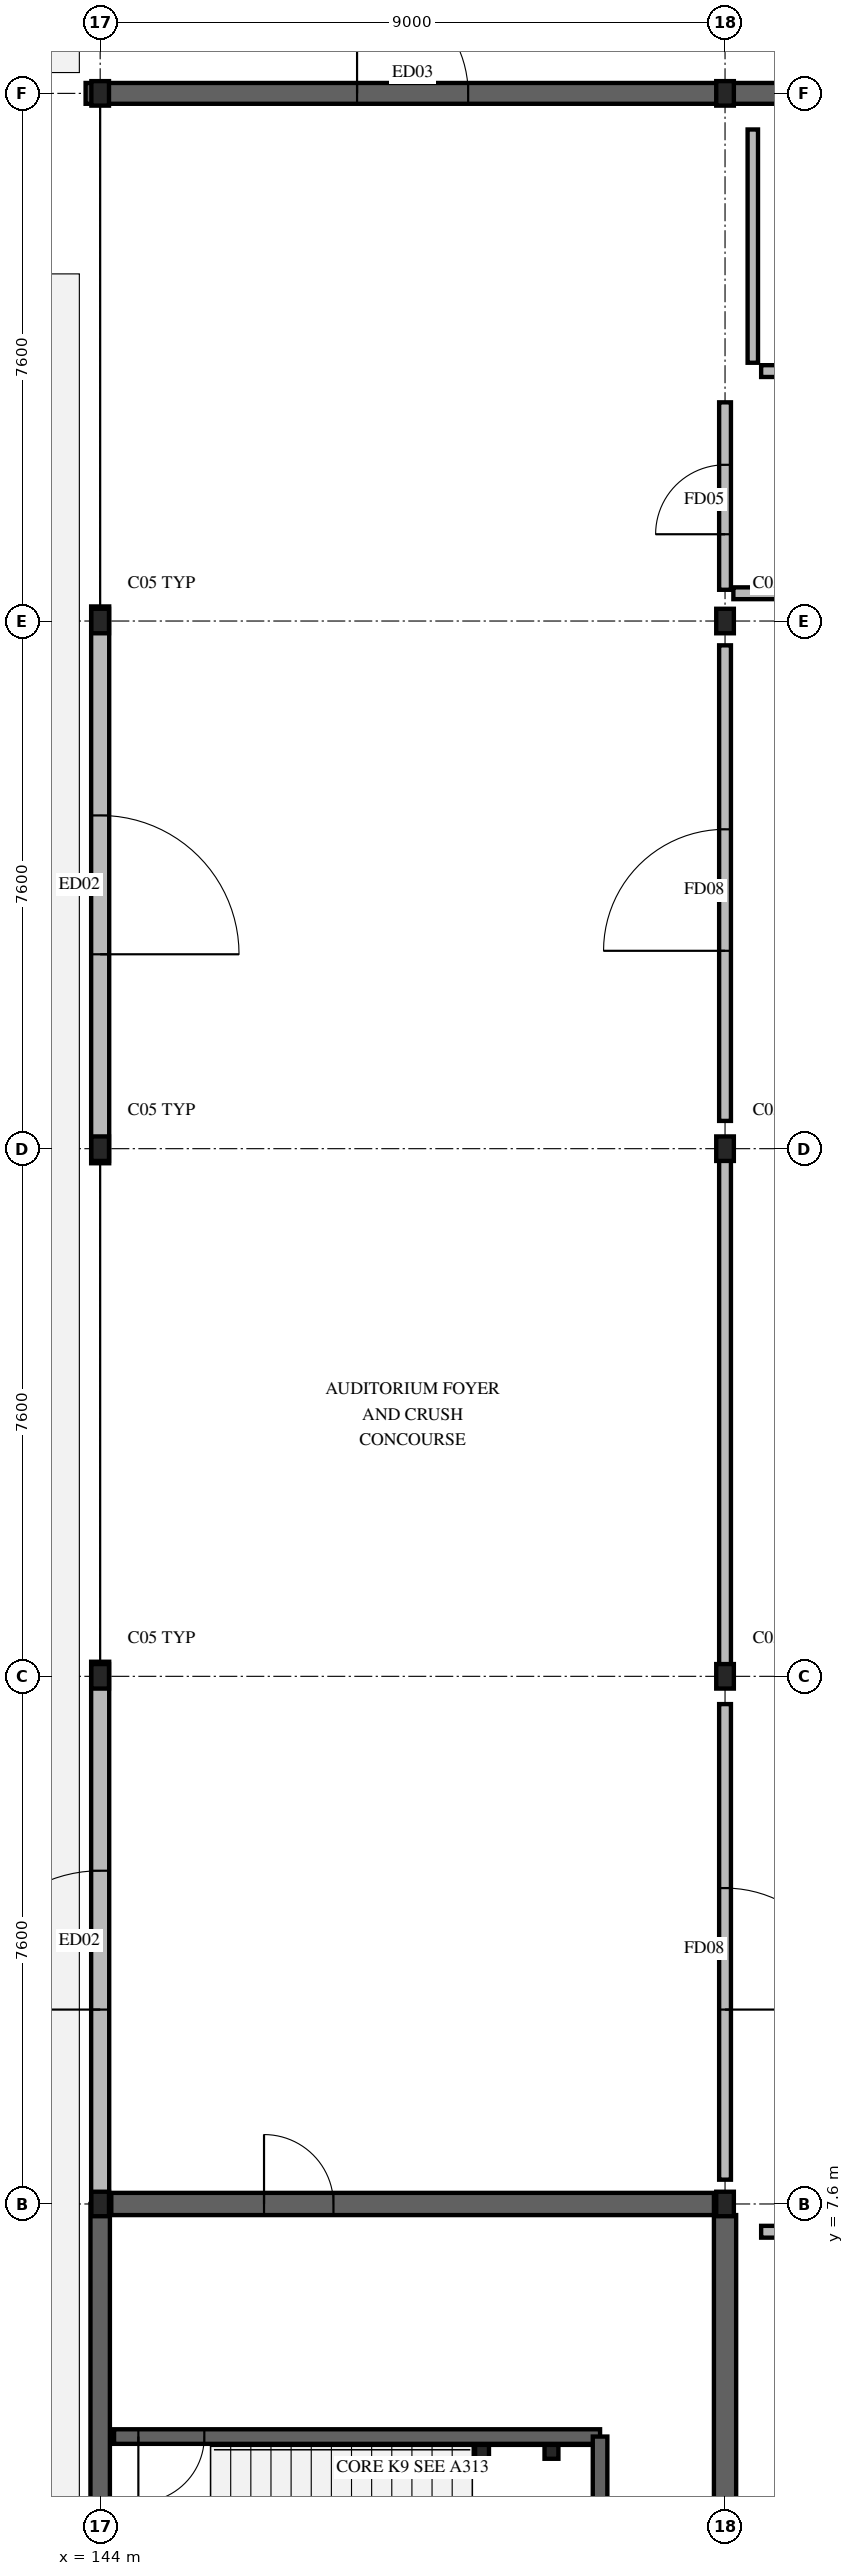
"""IFC4 building model, lengths in metres.
Left out: names, types, materials, properties, quantities, classifications, styles, units other than length and angle.
Written with IfcOpenShell. Run it as: python <this file> out.ifc"""

import sys

from ifc_helpers import new_model, si_unit, direction, frame, frame_2d, origin, origin_2d, place, context, subcontext, project, spatial, rectangle, hollow_rectangle, i_section, extrude, element, fill, save


model = new_model("IFC4")
c1 = context("Model", 3, precision=1e-05, world=origin(), true_north=direction((0.0, 1.0)))
c2 = subcontext(c1, "Body", "Model", "MODEL_VIEW")
j1 = project(units=[si_unit("LENGTHUNIT", "METRE"), si_unit("PLANEANGLEUNIT", "RADIAN")], contexts=[c1])
p1 = place(None, origin())
s1 = spatial("IfcSite", under=j1, at=p1, CompositionType="ELEMENT")
p2 = place(p1, origin())
s2 = spatial("IfcBuilding", under=s1, at=p2, CompositionType="ELEMENT")
p3 = place(p2, origin())
s3 = spatial("IfcBuildingStorey", under=s2, at=p3, CompositionType="ELEMENT", Elevation=0.0)
for number, where, z_axis, x_axis in (
    (1, (144.0, 7.6, 0.0), (0.0, 0.0, 1.0), (1.0, 0.0, 0.0)),
    (2, (144.0, 15.2, 0.0), (0.0, 0.0, 1.0), (1.0, 0.0, 0.0)),
    (3, (144.0, 22.8, 0.0), (0.0, 0.0, 1.0), (1.0, 0.0, 0.0)),
    (4, (144.0, 30.4, 0.0), (0.0, 0.0, 1.0), (1.0, 0.0, 0.0)),
    (5, (144.0, 38.0, 0.0), (0.0, 0.0, 1.0), (1.0, 0.0, 0.0)),
    (6, (153.0, 7.6, 0.0), (0.0, 0.0, 1.0), (1.0, 0.0, 0.0)),
    (7, (153.0, 15.2, 0.0), (0.0, 0.0, 1.0), (1.0, 0.0, 0.0)),
    (8, (153.0, 22.8, 0.0), (0.0, 0.0, 1.0), (1.0, 0.0, 0.0)),
    (9, (153.0, 30.4, 0.0), (0.0, 0.0, 1.0), (1.0, 0.0, 0.0)),
    (10, (153.0, 38.0, 0.0), (0.0, 0.0, 1.0), (1.0, 0.0, 0.0)),
):
    element("IfcColumn", number, at=place(p3, frame(where, z_axis=z_axis, x_axis=x_axis)), inside=s3, PredefinedType="COLUMN", context=c2, shape_type="SweptSolid", body=[
        extrude(i_section(OverallWidth=0.254, OverallDepth=0.353, WebThickness=0.01, FlangeThickness=0.016, FilletRadius=0.015, at=origin_2d()), origin(), (0.0, 0.0, 1.0), 5.04),
    ])
p4 = place(p3, frame((144.0, 0.0, 0.0), z_axis=(0.0, 0.0, 1.0), x_axis=(0.0, 1.0, 0.0)))
e11 = element("IfcWall", 11, at=p4, inside=s3, PredefinedType="SOLIDWALL", context=c2, shape_type="SweptSolid", body=[
    extrude(rectangle(XDim=7.6, YDim=0.28, at=frame_2d((3.8, 0.0))), origin(), (0.0, 0.0, 1.0), 5.04),
])
p5 = place(p3, frame((144.0, 7.6, 0.0), z_axis=(0.0, 0.0, 1.0), x_axis=(0.0, 1.0, 0.0)))
e12 = element("IfcWall", 12, at=p5, inside=s3, PredefinedType="STANDARD", context=c2, shape_type="SweptSolid", body=[
    extrude(rectangle(XDim=7.81, YDim=0.26, at=frame_2d((3.905, 0.0))), origin(), (0.0, 0.0, 1.0), 4.411),
])
p6 = place(p5, frame((2.8, 0.0, 0.0)))
e13 = element("IfcOpeningElement", 13, at=p6, cuts=e12, PredefinedType="OPENING", context=c2, shape_type="SweptSolid", body=[
    extrude(rectangle(XDim=2.0, YDim=2.35, at=frame_2d((1.0, 1.175))), frame((0.0, 0.14, 0.0), z_axis=(0.0, -1.0, 0.0), x_axis=(1.0, 0.0, 0.0)), (0.0, 0.0, 1.0), 0.28),
])
p7 = place(p3, frame((144.0, 22.59, 0.0), z_axis=(0.0, 0.0, 1.0), x_axis=(0.0, 1.0, 0.0)))
e14 = element("IfcWall", 14, at=p7, inside=s3, PredefinedType="STANDARD", context=c2, shape_type="SweptSolid", body=[
    extrude(rectangle(XDim=8.02, YDim=0.26, at=frame_2d((4.01, 0.0))), origin(), (0.0, 0.0, 1.0), 4.411),
])
p8 = place(p7, frame((3.01, 0.0, 0.0)))
e15 = element("IfcOpeningElement", 15, at=p8, cuts=e14, PredefinedType="OPENING", context=c2, shape_type="SweptSolid", body=[
    extrude(rectangle(XDim=2.0, YDim=2.35, at=frame_2d((1.0, 1.175))), frame((0.0, 0.14, 0.0), z_axis=(0.0, -1.0, 0.0), x_axis=(1.0, 0.0, 0.0)), (0.0, 0.0, 1.0), 0.28),
])
p9 = place(p3, frame((143.79, 38.0, 0.0), z_axis=(0.0, 0.0, 1.0), x_axis=(1.0, 0.0, 0.0)))
e16 = element("IfcWall", 16, at=p9, inside=s3, PredefinedType="SOLIDWALL", context=c2, shape_type="SweptSolid", body=[
    extrude(rectangle(XDim=9.21, YDim=0.3, at=frame_2d((4.605, 0.0))), origin(), (0.0, 0.0, 1.0), 5.04),
])
p10 = place(p9, frame((3.91, 0.0, 0.0)))
e17 = element("IfcOpeningElement", 17, at=p10, cuts=e16, PredefinedType="OPENING", context=c2, shape_type="SweptSolid", body=[
    extrude(rectangle(XDim=1.6, YDim=2.2, at=frame_2d((0.8, 1.1))), frame((0.0, 0.16, 0.0), z_axis=(0.0, -1.0, 0.0), x_axis=(1.0, 0.0, 0.0)), (0.0, 0.0, 1.0), 0.32),
])
p11 = place(p3, frame((153.0, 38.0, 0.0), z_axis=(0.0, 0.0, 1.0), x_axis=(1.0, 0.0, 0.0)))
e18 = element("IfcWall", 18, at=p11, inside=s3, PredefinedType="SOLIDWALL", context=c2, shape_type="SweptSolid", body=[
    extrude(rectangle(XDim=9.0, YDim=0.3, at=frame_2d((4.5, 0.0))), origin(), (0.0, 0.0, 1.0), 5.04),
])
p12 = place(p3, frame((144.16, 7.6, 0.0), z_axis=(0.0, 0.0, 1.0), x_axis=(1.0, 0.0, 0.0)))
e19 = element("IfcWall", 19, at=p12, inside=s3, PredefinedType="SHEAR", context=c2, shape_type="SweptSolid", body=[
    extrude(rectangle(XDim=8.68, YDim=0.32, at=frame_2d((4.34, 0.0))), origin(), (0.0, 0.0, 1.0), 4.76),
])
p13 = place(p12, frame((2.2, 0.0, 0.0)))
e20 = element("IfcOpeningElement", 20, at=p13, cuts=e19, PredefinedType="OPENING", context=c2, shape_type="SweptSolid", body=[
    extrude(rectangle(XDim=1.0, YDim=2.15, at=frame_2d((0.5, 1.075))), frame((0.0, 0.17, 0.0), z_axis=(0.0, -1.0, 0.0), x_axis=(1.0, 0.0, 0.0)), (0.0, 0.0, 1.0), 0.34),
])
p14 = place(p3, frame((153.0, 0.16, 0.0), z_axis=(0.0, 0.0, 1.0), x_axis=(0.0, 1.0, 0.0)))
e21 = element("IfcWall", 21, at=p14, inside=s3, PredefinedType="SHEAR", context=c2, shape_type="SweptSolid", body=[
    extrude(rectangle(XDim=7.28, YDim=0.32, at=frame_2d((3.64, 0.0))), origin(), (0.0, 0.0, 1.0), 4.76),
])
p15 = place(p3, frame((144.2, 4.25, 0.0), z_axis=(0.0, 0.0, 1.0), x_axis=(1.0, 0.0, 0.0)))
e22 = element("IfcWall", 22, at=p15, inside=s3, PredefinedType="SOLIDWALL", context=c2, shape_type="SweptSolid", body=[
    extrude(rectangle(XDim=7.0, YDim=0.21, at=frame_2d((3.5, 0.0))), origin(), (0.0, 0.0, 1.0), 4.76),
])
p16 = place(p15, frame((0.35, 0.0, 0.0)))
e23 = element("IfcOpeningElement", 23, at=p16, cuts=e22, PredefinedType="OPENING", context=c2, shape_type="SweptSolid", body=[
    extrude(rectangle(XDim=0.95, YDim=2.12, at=frame_2d((0.475, 1.06))), frame((0.0, 0.115, 0.0), z_axis=(0.0, -1.0, 0.0), x_axis=(1.0, 0.0, 0.0)), (0.0, 0.0, 1.0), 0.23),
])
p17 = place(p3, frame((151.2, 0.2, 0.0), z_axis=(0.0, 0.0, 1.0), x_axis=(0.0, 1.0, 0.0)))
e24 = element("IfcWall", 24, at=p17, inside=s3, PredefinedType="SOLIDWALL", context=c2, shape_type="SweptSolid", body=[
    extrude(rectangle(XDim=4.05, YDim=0.21, at=frame_2d((2.025, 0.0))), origin(), (0.0, 0.0, 1.0), 4.76),
])
for number, where, z_axis, x_axis in (
    (25, (149.5, 4.03, 0.0), (0.0, 0.0, 1.0), (1.0, 0.0, 0.0)),
    (26, (150.5, 4.03, 0.0), (0.0, 0.0, 1.0), (1.0, 0.0, 0.0)),
):
    element("IfcColumn", number, at=place(p3, frame(where, z_axis=z_axis, x_axis=x_axis)), inside=s3, PredefinedType="COLUMN", context=c2, shape_type="SweptSolid", body=[
        extrude(hollow_rectangle(XDim=0.2, YDim=0.2, WallThickness=0.012, at=origin_2d()), origin(), (0.0, 0.0, 1.0), 5.04),
    ])
p18 = place(p3, frame((153.0, 30.85, 0.0), z_axis=(0.0, 0.0, 1.0), x_axis=(0.0, 1.0, 0.0)))
e27 = element("IfcWall", 27, at=p18, inside=s3, PredefinedType="PARTITIONING", context=c2, shape_type="SweptSolid", body=[
    extrude(rectangle(XDim=2.7, YDim=0.17, at=frame_2d((1.35, 0.0))), origin(), (0.0, 0.0, 1.0), 4.411),
])
p19 = place(p18, frame((0.8, 0.0, 0.0)))
e28 = element("IfcOpeningElement", 28, at=p19, cuts=e27, PredefinedType="OPENING", context=c2, shape_type="SweptSolid", body=[
    extrude(rectangle(XDim=1.0, YDim=2.15, at=frame_2d((0.5, 1.075))), frame((0.0, 0.095, 0.0), z_axis=(0.0, -1.0, 0.0), x_axis=(1.0, 0.0, 0.0)), (0.0, 0.0, 1.0), 0.19),
])
p20 = place(p3, frame((153.0, 7.95, 0.0), z_axis=(0.0, 0.0, 1.0), x_axis=(0.0, 1.0, 0.0)))
e29 = element("IfcWall", 29, at=p20, inside=s3, PredefinedType="PARTITIONING", context=c2, shape_type="SweptSolid", body=[
    extrude(rectangle(XDim=6.85, YDim=0.17, at=frame_2d((3.425, 0.0))), origin(), (0.0, 0.0, 1.0), 4.411),
])
p21 = place(p20, frame((2.45, 0.0, 0.0)))
e30 = element("IfcOpeningElement", 30, at=p21, cuts=e29, PredefinedType="OPENING", context=c2, shape_type="SweptSolid", body=[
    extrude(rectangle(XDim=1.75, YDim=2.22, at=frame_2d((0.875, 1.11))), frame((0.0, 0.095, 0.0), z_axis=(0.0, -1.0, 0.0), x_axis=(1.0, 0.0, 0.0)), (0.0, 0.0, 1.0), 0.19),
])
p22 = place(p3, frame((153.0, 15.05, 0.0), z_axis=(0.0, 0.0, 1.0), x_axis=(0.0, 1.0, 0.0)))
e31 = element("IfcWall", 31, at=p22, inside=s3, PredefinedType="PARTITIONING", context=c2, shape_type="SweptSolid", body=[
    extrude(rectangle(XDim=7.9, YDim=0.17, at=frame_2d((3.95, 0.0))), origin(), (0.0, 0.0, 1.0), 4.411),
])
p23 = place(p3, frame((153.0, 23.2, 0.0), z_axis=(0.0, 0.0, 1.0), x_axis=(0.0, 1.0, 0.0)))
e32 = element("IfcWall", 32, at=p23, inside=s3, PredefinedType="PARTITIONING", context=c2, shape_type="SweptSolid", body=[
    extrude(rectangle(XDim=6.85, YDim=0.17, at=frame_2d((3.425, 0.0))), origin(), (0.0, 0.0, 1.0), 4.411),
])
p24 = place(p23, frame((2.45, 0.0, 0.0)))
e33 = element("IfcOpeningElement", 33, at=p24, cuts=e32, PredefinedType="OPENING", context=c2, shape_type="SweptSolid", body=[
    extrude(rectangle(XDim=1.75, YDim=2.22, at=frame_2d((0.875, 1.11))), frame((0.0, 0.095, 0.0), z_axis=(0.0, -1.0, 0.0), x_axis=(1.0, 0.0, 0.0)), (0.0, 0.0, 1.0), 0.19),
])
p25 = place(p3, frame((153.52, 34.0, 0.0), z_axis=(0.0, 0.0, 1.0), x_axis=(1.0, 0.0, 0.0)))
e34 = element("IfcWall", 34, at=p25, inside=s3, PredefinedType="PARTITIONING", context=c2, shape_type="SweptSolid", body=[
    extrude(rectangle(XDim=16.96, YDim=0.17, at=frame_2d((8.48, 0.0))), origin(), (0.0, 0.0, 1.0), 4.76),
])
p26 = place(p25, frame((7.67, 0.0, 0.0)))
e35 = element("IfcOpeningElement", 35, at=p26, cuts=e34, PredefinedType="OPENING", context=c2, shape_type="SweptSolid", body=[
    extrude(rectangle(XDim=1.62, YDim=2.2, at=frame_2d((0.81, 1.1))), frame((0.0, 0.095, 0.0), z_axis=(0.0, -1.0, 0.0), x_axis=(1.0, 0.0, 0.0)), (0.0, 0.0, 1.0), 0.19),
])
p27 = place(p25, frame((5.455, 0.0, 0.0)))
e36 = element("IfcOpeningElement", 36, at=p27, cuts=e34, PredefinedType="OPENING", context=c2, shape_type="SweptSolid", body=[
    extrude(rectangle(XDim=1.25, YDim=2.18, at=frame_2d((0.625, 1.09))), frame((0.0, 0.095, 0.0), z_axis=(0.0, -1.0, 0.0), x_axis=(1.0, 0.0, 0.0)), (0.0, 0.0, 1.0), 0.19),
])
p28 = place(p3, frame((153.4, 34.12, 0.0), z_axis=(0.0, 0.0, 1.0), x_axis=(0.0, 1.0, 0.0)))
e37 = element("IfcWall", 37, at=p28, inside=s3, PredefinedType="PARTITIONING", context=c2, shape_type="SweptSolid", body=[
    extrude(rectangle(XDim=3.36, YDim=0.15, at=frame_2d((1.68, 0.0))), origin(), (0.0, 0.0, 1.0), 4.76),
])
p29 = place(p3, frame((153.52, 7.2, 0.0), z_axis=(0.0, 0.0, 1.0), x_axis=(1.0, 0.0, 0.0)))
e38 = element("IfcWall", 38, at=p29, inside=s3, PredefinedType="PARTITIONING", context=c2, shape_type="SweptSolid", body=[
    extrude(rectangle(XDim=25.96, YDim=0.17, at=frame_2d((12.98, 0.0))), origin(), (0.0, 0.0, 1.0), 4.76),
])
p30 = place(p3, frame((153.12, 30.8, 0.0), z_axis=(0.0, 0.0, 1.0), x_axis=(1.0, 0.0, 0.0)))
e39 = element("IfcWall", 39, at=p30, inside=s3, PredefinedType="PARTITIONING", context=c2, shape_type="SweptSolid", body=[
    extrude(rectangle(XDim=26.36, YDim=0.17, at=frame_2d((13.18, 0.0))), origin(), (0.0, 0.0, 1.0), 4.76),
])
p31 = place(p6, origin())
e40 = element("IfcDoor", 40, at=p31, inside=s3, OperationType="SINGLE_SWING_LEFT", PredefinedType="DOOR", context=c2, shape_type="SweptSolid", body=[
    extrude(rectangle(XDim=2.0, YDim=2.35, at=frame_2d((1.0, 1.175))), frame((0.0, 0.025, 0.0), z_axis=(0.0, -1.0, 0.0), x_axis=(1.0, 0.0, 0.0)), (0.0, 0.0, 1.0), 0.05),
])
fill(e13, e40)
p32 = place(p8, origin())
e41 = element("IfcDoor", 41, at=p32, inside=s3, OperationType="SINGLE_SWING_RIGHT", PredefinedType="DOOR", context=c2, shape_type="SweptSolid", body=[
    extrude(rectangle(XDim=2.0, YDim=2.35, at=frame_2d((1.0, 1.175))), frame((0.0, 0.025, 0.0), z_axis=(0.0, -1.0, 0.0), x_axis=(1.0, 0.0, 0.0)), (0.0, 0.0, 1.0), 0.05),
])
fill(e15, e41)
p33 = place(p10, origin())
e42 = element("IfcDoor", 42, at=p33, inside=s3, OperationType="SINGLE_SWING_LEFT", PredefinedType="DOOR", context=c2, shape_type="SweptSolid", body=[
    extrude(rectangle(XDim=1.6, YDim=2.2, at=frame_2d((0.8, 1.1))), frame((0.0, 0.025, 0.0), z_axis=(0.0, -1.0, 0.0), x_axis=(1.0, 0.0, 0.0)), (0.0, 0.0, 1.0), 0.05),
])
fill(e17, e42)
p34 = place(p16, origin())
e43 = element("IfcDoor", 43, at=p34, inside=s3, OperationType="SINGLE_SWING_RIGHT", PredefinedType="DOOR", context=c2, shape_type="SweptSolid", body=[
    extrude(rectangle(XDim=0.95, YDim=2.12, at=frame_2d((0.475, 1.06))), frame((0.0, 0.025, 0.0), z_axis=(0.0, -1.0, 0.0), x_axis=(1.0, 0.0, 0.0)), (0.0, 0.0, 1.0), 0.05),
])
fill(e23, e43)
p35 = place(p13, origin())
e44 = element("IfcDoor", 44, at=p35, inside=s3, OperationType="SINGLE_SWING_LEFT", PredefinedType="DOOR", context=c2, shape_type="SweptSolid", body=[
    extrude(rectangle(XDim=1.0, YDim=2.15, at=frame_2d((0.5, 1.075))), frame((0.0, 0.025, 0.0), z_axis=(0.0, -1.0, 0.0), x_axis=(1.0, 0.0, 0.0)), (0.0, 0.0, 1.0), 0.05),
])
fill(e20, e44)
p36 = place(p19, origin())
e45 = element("IfcDoor", 45, at=p36, inside=s3, OperationType="SINGLE_SWING_LEFT", PredefinedType="DOOR", context=c2, shape_type="SweptSolid", body=[
    extrude(rectangle(XDim=1.0, YDim=2.15, at=frame_2d((0.5, 1.075))), frame((0.0, 0.025, 0.0), z_axis=(0.0, -1.0, 0.0), x_axis=(1.0, 0.0, 0.0)), (0.0, 0.0, 1.0), 0.05),
])
fill(e28, e45)
p37 = place(p21, origin())
e46 = element("IfcDoor", 46, at=p37, inside=s3, OperationType="SINGLE_SWING_RIGHT", PredefinedType="DOOR", context=c2, shape_type="SweptSolid", body=[
    extrude(rectangle(XDim=1.75, YDim=2.22, at=frame_2d((0.875, 1.11))), frame((0.0, 0.025, 0.0), z_axis=(0.0, -1.0, 0.0), x_axis=(1.0, 0.0, 0.0)), (0.0, 0.0, 1.0), 0.05),
])
fill(e30, e46)
p38 = place(p24, origin())
e47 = element("IfcDoor", 47, at=p38, inside=s3, OperationType="SINGLE_SWING_LEFT", PredefinedType="DOOR", context=c2, shape_type="SweptSolid", body=[
    extrude(rectangle(XDim=1.75, YDim=2.22, at=frame_2d((0.875, 1.11))), frame((0.0, 0.025, 0.0), z_axis=(0.0, -1.0, 0.0), x_axis=(1.0, 0.0, 0.0)), (0.0, 0.0, 1.0), 0.05),
])
fill(e33, e47)
save(model, sys.argv[1])
